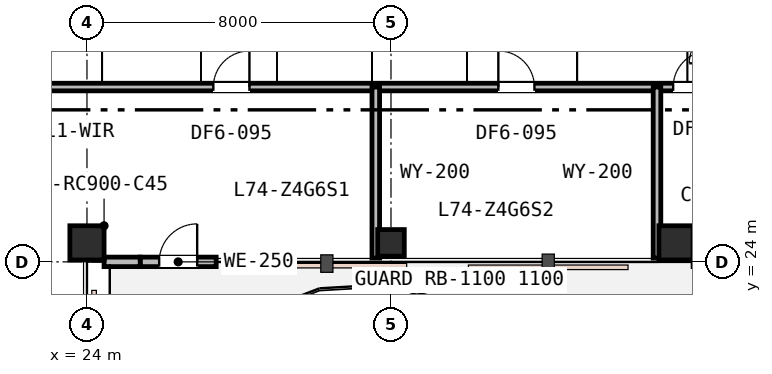
"""IFC4 building model, lengths in metres.
Left out: names, types, materials, properties, quantities, classifications, styles, units other than length and angle.
Written with IfcOpenShell. Run it as: python <this file> out.ifc"""

import sys

from ifc_helpers import new_model, si_unit, direction, frame, frame_2d, origin, origin_2d, place, context, subcontext, project, spatial, rectangle, extrude, element, fill, save


model = new_model("IFC4")
c1 = context("Model", 3, precision=1e-05, world=origin(), true_north=direction((0.0, 1.0)))
c2 = subcontext(c1, "Body", "Model", "MODEL_VIEW")
j1 = project(units=[si_unit("LENGTHUNIT", "METRE"), si_unit("PLANEANGLEUNIT", "RADIAN")], contexts=[c1])
p1 = place(None, origin())
s1 = spatial("IfcSite", under=j1, at=p1, CompositionType="ELEMENT")
p2 = place(p1, origin())
s2 = spatial("IfcBuilding", under=s1, at=p2, CompositionType="ELEMENT")
p3 = place(p2, frame((0.0, 0.0, 286.8)))
s3 = spatial("IfcBuildingStorey", under=s2, at=p3, CompositionType="ELEMENT", Elevation=286.8)
p4 = place(p3, frame((24.0, 24.5, 0.0), z_axis=(0.0, 0.0, 1.0), x_axis=(1.0, 0.0, 0.0)))
e1 = element("IfcColumn", 1, at=p4, inside=s3, PredefinedType="COLUMN", context=c2, shape_type="SweptSolid", body=[
    extrude(rectangle(XDim=0.9, YDim=0.9, at=origin_2d()), origin(), (0.0, 0.0, 1.0), 3.8),
])
p5 = place(p3, frame((32.0, 24.5, 0.0), z_axis=(0.0, 0.0, 1.0), x_axis=(1.0, 0.0, 0.0)))
e2 = element("IfcColumn", 2, at=p5, inside=s3, PredefinedType="COLUMN", context=c2, shape_type="SweptSolid", body=[
    extrude(rectangle(XDim=0.7, YDim=0.7, at=origin_2d()), origin(), (0.0, 0.0, 1.0), 3.8),
])
p6 = place(p3, frame((39.5, 24.5, 0.0), z_axis=(0.0, 0.0, 1.0), x_axis=(1.0, 0.0, 0.0)))
e3 = element("IfcColumn", 3, at=p6, inside=s3, PredefinedType="COLUMN", context=c2, shape_type="SweptSolid", body=[
    extrude(rectangle(XDim=0.9, YDim=0.9, at=origin_2d()), origin(), (0.0, 0.0, 1.0), 3.8),
])
p7 = place(p3, frame((25.4, 24.0, 0.0), z_axis=(0.0, 0.0, 1.0), x_axis=(1.0, 0.0, 0.0)))
e4 = element("IfcWall", 4, at=p7, inside=s3, PredefinedType="STANDARD", context=c2, shape_type="SweptSolid", body=[
    extrude(rectangle(XDim=2.0, YDim=0.25, at=frame_2d((1.0, 0.0))), origin(), (0.0, 0.0, 1.0), 3.22),
])
p8 = place(p7, frame((0.5, 0.0, 0.0)))
e5 = element("IfcOpeningElement", 5, at=p8, cuts=e4, PredefinedType="OPENING", context=c2, shape_type="SweptSolid", body=[
    extrude(rectangle(XDim=1.0, YDim=2.15, at=frame_2d((0.5, 1.075))), frame((0.0, 0.135, 0.0), z_axis=(0.0, -1.0, 0.0), x_axis=(1.0, 0.0, 0.0)), (0.0, 0.0, 1.0), 0.27),
])
p9 = place(p3, frame((24.45, 24.0, 0.0), z_axis=(0.0, 0.0, 1.0), x_axis=(1.0, 0.0, 0.0)))
e6 = element("IfcWall", 6, at=p9, inside=s3, PredefinedType="STANDARD", context=c2, shape_type="SweptSolid", body=[
    extrude(rectangle(XDim=0.95, YDim=0.25, at=frame_2d((0.475, 0.0))), origin(), (0.0, 0.0, 1.0), 3.22),
])
p10 = place(p3, frame((21.8, 28.6, 0.0), z_axis=(0.0, 0.0, 1.0), x_axis=(1.0, 0.0, 0.0)))
e7 = element("IfcWall", 7, at=p10, inside=s3, PredefinedType="PARTITIONING", context=c2, shape_type="SweptSolid", body=[
    extrude(rectangle(XDim=24.1, YDim=0.2, at=frame_2d((12.05, 0.0))), origin(), (0.0, 0.0, 1.0), 3.18),
])
p11 = place(p10, frame((5.525, 0.0, 0.0)))
e8 = element("IfcOpeningElement", 8, at=p11, cuts=e7, PredefinedType="OPENING", context=c2, shape_type="SweptSolid", body=[
    extrude(rectangle(XDim=0.95, YDim=2.15, at=frame_2d((0.475, 1.075))), frame((0.0, 0.11, 0.0), z_axis=(0.0, -1.0, 0.0), x_axis=(1.0, 0.0, 0.0)), (0.0, 0.0, 1.0), 0.22),
])
p12 = place(p10, frame((13.025, 0.0, 0.0)))
e9 = element("IfcOpeningElement", 9, at=p12, cuts=e7, PredefinedType="OPENING", context=c2, shape_type="SweptSolid", body=[
    extrude(rectangle(XDim=0.95, YDim=2.15, at=frame_2d((0.475, 1.075))), frame((0.0, 0.11, 0.0), z_axis=(0.0, -1.0, 0.0), x_axis=(1.0, 0.0, 0.0)), (0.0, 0.0, 1.0), 0.22),
])
p13 = place(p10, frame((17.625, 0.0, 0.0)))
e10 = element("IfcOpeningElement", 10, at=p13, cuts=e7, PredefinedType="OPENING", context=c2, shape_type="SweptSolid", body=[
    extrude(rectangle(XDim=0.95, YDim=2.15, at=frame_2d((0.475, 1.075))), frame((0.0, 0.11, 0.0), z_axis=(0.0, -1.0, 0.0), x_axis=(1.0, 0.0, 0.0)), (0.0, 0.0, 1.0), 0.22),
])
for number, where, z_axis, x_axis in (
    (11, (31.6, 24.1, 0.0), (0.0, 0.0, 1.0), (0.0, 1.0, 0.0)),
    (12, (39.0, 24.1, 0.0), (0.0, 0.0, 1.0), (0.0, 1.0, 0.0)),
):
    element("IfcWall", number, at=place(p3, frame(where, z_axis=z_axis, x_axis=x_axis)), inside=s3, PredefinedType="PARTITIONING", context=c2, shape_type="SweptSolid", body=[
        extrude(rectangle(XDim=4.5, YDim=0.2, at=frame_2d((2.25, 0.0))), origin(), (0.0, 0.0, 1.0), 3.18),
    ])
p14 = place(p8, origin())
e13 = element("IfcDoor", 13, at=p14, inside=s3, OperationType="SINGLE_SWING_RIGHT", PredefinedType="DOOR", context=c2, shape_type="SweptSolid", body=[
    extrude(rectangle(XDim=1.0, YDim=2.15, at=frame_2d((0.5, 1.075))), frame((0.0, 0.025, 0.0), z_axis=(0.0, -1.0, 0.0), x_axis=(1.0, 0.0, 0.0)), (0.0, 0.0, 1.0), 0.05),
])
fill(e5, e13)
p15 = place(p11, origin())
e14 = element("IfcDoor", 14, at=p15, inside=s3, OperationType="SINGLE_SWING_RIGHT", PredefinedType="DOOR", context=c2, shape_type="SweptSolid", body=[
    extrude(rectangle(XDim=0.95, YDim=2.15, at=frame_2d((0.475, 1.075))), frame((0.0, 0.025, 0.0), z_axis=(0.0, -1.0, 0.0), x_axis=(1.0, 0.0, 0.0)), (0.0, 0.0, 1.0), 0.05),
])
fill(e8, e14)
p16 = place(p12, origin())
e15 = element("IfcDoor", 15, at=p16, inside=s3, OperationType="SINGLE_SWING_LEFT", PredefinedType="DOOR", context=c2, shape_type="SweptSolid", body=[
    extrude(rectangle(XDim=0.95, YDim=2.15, at=frame_2d((0.475, 1.075))), frame((0.0, 0.025, 0.0), z_axis=(0.0, -1.0, 0.0), x_axis=(1.0, 0.0, 0.0)), (0.0, 0.0, 1.0), 0.05),
])
fill(e9, e15)
p17 = place(p13, origin())
e16 = element("IfcDoor", 16, at=p17, inside=s3, OperationType="SINGLE_SWING_RIGHT", PredefinedType="DOOR", context=c2, shape_type="SweptSolid", body=[
    extrude(rectangle(XDim=0.95, YDim=2.15, at=frame_2d((0.475, 1.075))), frame((0.0, 0.025, 0.0), z_axis=(0.0, -1.0, 0.0), x_axis=(1.0, 0.0, 0.0)), (0.0, 0.0, 1.0), 0.05),
])
fill(e10, e16)
save(model, sys.argv[1])
